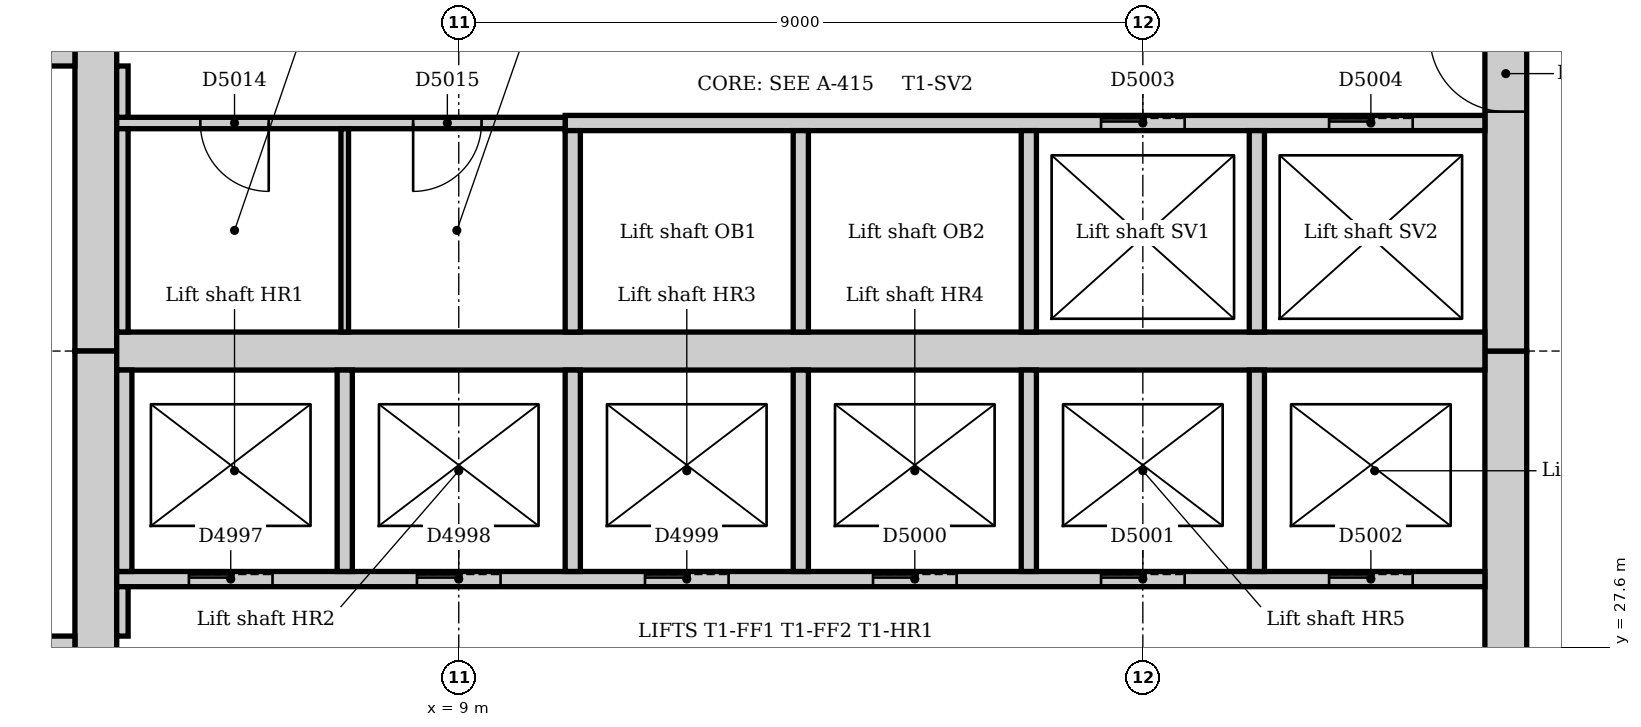
"""IFC4 building model, lengths in metres.
Left out: names, types, materials, properties, quantities, classifications, styles, units other than length and angle.
Written with IfcOpenShell. Run it as: python <this file> out.ifc"""

import sys

from ifc_helpers import new_model, si_unit, direction, frame, frame_2d, origin, place, context, subcontext, project, spatial, rectangle, extrude, element, fill, save


model = new_model("IFC4")
c1 = context("Model", 3, precision=1e-05, world=origin(), true_north=direction((0.0, 1.0)))
c2 = subcontext(c1, "Body", "Model", "MODEL_VIEW")
j1 = project(units=[si_unit("LENGTHUNIT", "METRE"), si_unit("PLANEANGLEUNIT", "RADIAN")], contexts=[c1])
p1 = place(None, origin())
s1 = spatial("IfcSite", under=j1, at=p1, CompositionType="ELEMENT")
p2 = place(p1, origin())
s2 = spatial("IfcBuilding", under=s1, at=p2, CompositionType="ELEMENT")
p3 = place(p2, frame((0.0, 0.0, 206.0)))
s3 = spatial("IfcBuildingStorey", under=s2, at=p3, CompositionType="ELEMENT", Elevation=206.0)
p4 = place(p3, frame((22.775, 21.0, 0.0), z_axis=(0.0, 0.0, 1.0), x_axis=(0.0, 1.0, 0.0)))
e1 = element("IfcWall", 1, at=p4, inside=s3, PredefinedType="SOLIDWALL", context=c2, shape_type="SweptSolid", body=[
    extrude(rectangle(XDim=10.5, YDim=0.55, at=frame_2d((5.25, 0.0))), origin(), (0.0, 0.0, 1.0), 4.0),
])
p5 = place(p4, frame((4.35, 0.0, 0.0)))
e2 = element("IfcOpeningElement", 2, at=p5, cuts=e1, PredefinedType="OPENING", context=c2, shape_type="SweptSolid", body=[
    extrude(rectangle(XDim=1.8, YDim=2.1, at=frame_2d((0.9, 1.05))), frame((0.0, 0.285, 0.0), z_axis=(0.0, -1.0, 0.0), x_axis=(1.0, 0.0, 0.0)), (0.0, 0.0, 1.0), 0.57),
])
p6 = place(p3, frame((22.775, 31.5, 0.0), z_axis=(0.0, 0.0, 1.0), x_axis=(0.0, 1.0, 0.0)))
e3 = element("IfcWall", 3, at=p6, inside=s3, PredefinedType="SOLIDWALL", context=c2, shape_type="SweptSolid", body=[
    extrude(rectangle(XDim=10.5, YDim=0.55, at=frame_2d((5.25, 0.0))), origin(), (0.0, 0.0, 1.0), 4.0),
])
p7 = place(p6, frame((3.15, 0.0, 0.0)))
e4 = element("IfcOpeningElement", 4, at=p7, cuts=e3, PredefinedType="OPENING", context=c2, shape_type="SweptSolid", body=[
    extrude(rectangle(XDim=1.0, YDim=2.1, at=frame_2d((0.5, 1.05))), frame((0.0, 0.285, 0.0), z_axis=(0.0, -1.0, 0.0), x_axis=(1.0, 0.0, 0.0)), (0.0, 0.0, 1.0), 0.57),
])
p8 = place(p6, frame((5.2, 0.0, 0.0)))
e5 = element("IfcOpeningElement", 5, at=p8, cuts=e3, PredefinedType="OPENING", context=c2, shape_type="SweptSolid", body=[
    extrude(rectangle(XDim=1.0, YDim=2.1, at=frame_2d((0.5, 1.05))), frame((0.0, 0.285, 0.0), z_axis=(0.0, -1.0, 0.0), x_axis=(1.0, 0.0, 0.0)), (0.0, 0.0, 1.0), 0.57),
])
p9 = place(p3, frame((4.225, 42.0, 0.0), z_axis=(0.0, 0.0, 1.0), x_axis=(0.0, -1.0, 0.0)))
e6 = element("IfcWall", 6, at=p9, inside=s3, PredefinedType="SOLIDWALL", context=c2, shape_type="SweptSolid", body=[
    extrude(rectangle(XDim=10.5, YDim=0.55, at=frame_2d((5.25, 0.0))), origin(), (0.0, 0.0, 1.0), 4.0),
])
p10 = place(p9, frame((5.3, 0.0, 0.0)))
e7 = element("IfcOpeningElement", 7, at=p10, cuts=e6, PredefinedType="OPENING", context=c2, shape_type="SweptSolid", body=[
    extrude(rectangle(XDim=1.0, YDim=2.1, at=frame_2d((0.5, 1.05))), frame((0.0, 0.285, 0.0), z_axis=(0.0, -1.0, 0.0), x_axis=(1.0, 0.0, 0.0)), (0.0, 0.0, 1.0), 0.57),
])
p11 = place(p3, frame((4.225, 31.5, 0.0), z_axis=(0.0, 0.0, 1.0), x_axis=(0.0, -1.0, 0.0)))
e8 = element("IfcWall", 8, at=p11, inside=s3, PredefinedType="SOLIDWALL", context=c2, shape_type="SweptSolid", body=[
    extrude(rectangle(XDim=10.5, YDim=0.55, at=frame_2d((5.25, 0.0))), origin(), (0.0, 0.0, 1.0), 4.0),
])
p12 = place(p11, frame((4.25, 0.0, 0.0)))
e9 = element("IfcOpeningElement", 9, at=p12, cuts=e8, PredefinedType="OPENING", context=c2, shape_type="SweptSolid", body=[
    extrude(rectangle(XDim=1.0, YDim=2.1, at=frame_2d((0.5, 1.05))), frame((0.0, 0.285, 0.0), z_axis=(0.0, -1.0, 0.0), x_axis=(1.0, 0.0, 0.0)), (0.0, 0.0, 1.0), 0.57),
])
p13 = place(p3, frame((4.5, 31.5, 0.0), z_axis=(0.0, 0.0, 1.0), x_axis=(1.0, 0.0, 0.0)))
e10 = element("IfcWall", 10, at=p13, inside=s3, PredefinedType="SOLIDWALL", context=c2, shape_type="SweptSolid", body=[
    extrude(rectangle(XDim=18.0, YDim=0.5, at=frame_2d((9.0, 0.0))), origin(), (0.0, 0.0, 1.0), 4.0),
])
p14 = place(p3, frame((3.95, 27.625, 0.0), z_axis=(0.0, 0.0, 1.0), x_axis=(-1.0, 0.0, 0.0)))
e11 = element("IfcWall", 11, at=p14, inside=s3, PredefinedType="SOLIDWALL", context=c2, shape_type="SweptSolid", body=[
    extrude(rectangle(XDim=3.59, YDim=0.25, at=frame_2d((1.795, 0.0))), origin(), (0.0, 0.0, 1.0), 4.0),
])
p15 = place(p14, frame((0.45, 0.0, 0.0)))
e12 = element("IfcOpeningElement", 12, at=p15, cuts=e11, PredefinedType="OPENING", context=c2, shape_type="SweptSolid", body=[
    extrude(rectangle(XDim=1.0, YDim=2.1, at=frame_2d((0.5, 1.05))), frame((0.0, 0.135, 0.0), z_axis=(0.0, -1.0, 0.0), x_axis=(1.0, 0.0, 0.0)), (0.0, 0.0, 1.0), 0.27),
])
p16 = place(p3, frame((0.36, 35.375, 0.0), z_axis=(0.0, 0.0, 1.0), x_axis=(1.0, 0.0, 0.0)))
e13 = element("IfcWall", 13, at=p16, inside=s3, PredefinedType="SOLIDWALL", context=c2, shape_type="SweptSolid", body=[
    extrude(rectangle(XDim=3.59, YDim=0.25, at=frame_2d((1.795, 0.0))), origin(), (0.0, 0.0, 1.0), 4.0),
])
p17 = place(p16, frame((2.14, 0.0, 0.0)))
e14 = element("IfcOpeningElement", 14, at=p17, cuts=e13, PredefinedType="OPENING", context=c2, shape_type="SweptSolid", body=[
    extrude(rectangle(XDim=1.0, YDim=2.1, at=frame_2d((0.5, 1.05))), frame((0.0, 0.135, 0.0), z_axis=(0.0, -1.0, 0.0), x_axis=(1.0, 0.0, 0.0)), (0.0, 0.0, 1.0), 0.27),
])
p18 = place(p3, frame((4.5, 28.5, 0.0), z_axis=(0.0, 0.0, 1.0), x_axis=(1.0, 0.0, 0.0)))
e15 = element("IfcWall", 15, at=p18, inside=s3, PredefinedType="PARTITIONING", context=c2, shape_type="SweptSolid", body=[
    extrude(rectangle(XDim=18.0, YDim=0.2, at=frame_2d((9.0, 0.0))), origin(), (0.0, 0.0, 1.0), 3.85),
])
p19 = place(p18, frame((0.95, 0.0, 0.0)))
e16 = element("IfcOpeningElement", 16, at=p19, cuts=e15, PredefinedType="OPENING", context=c2, shape_type="SweptSolid", body=[
    extrude(rectangle(XDim=1.1, YDim=2.1, at=frame_2d((0.55, 1.05))), frame((0.0, 0.11, 0.0), z_axis=(0.0, -1.0, 0.0), x_axis=(1.0, 0.0, 0.0)), (0.0, 0.0, 1.0), 0.22),
])
p20 = place(p18, frame((3.95, 0.0, 0.0)))
e17 = element("IfcOpeningElement", 17, at=p20, cuts=e15, PredefinedType="OPENING", context=c2, shape_type="SweptSolid", body=[
    extrude(rectangle(XDim=1.1, YDim=2.1, at=frame_2d((0.55, 1.05))), frame((0.0, 0.11, 0.0), z_axis=(0.0, -1.0, 0.0), x_axis=(1.0, 0.0, 0.0)), (0.0, 0.0, 1.0), 0.22),
])
p21 = place(p18, frame((6.95, 0.0, 0.0)))
e18 = element("IfcOpeningElement", 18, at=p21, cuts=e15, PredefinedType="OPENING", context=c2, shape_type="SweptSolid", body=[
    extrude(rectangle(XDim=1.1, YDim=2.1, at=frame_2d((0.55, 1.05))), frame((0.0, 0.11, 0.0), z_axis=(0.0, -1.0, 0.0), x_axis=(1.0, 0.0, 0.0)), (0.0, 0.0, 1.0), 0.22),
])
p22 = place(p18, frame((9.95, 0.0, 0.0)))
e19 = element("IfcOpeningElement", 19, at=p22, cuts=e15, PredefinedType="OPENING", context=c2, shape_type="SweptSolid", body=[
    extrude(rectangle(XDim=1.1, YDim=2.1, at=frame_2d((0.55, 1.05))), frame((0.0, 0.11, 0.0), z_axis=(0.0, -1.0, 0.0), x_axis=(1.0, 0.0, 0.0)), (0.0, 0.0, 1.0), 0.22),
])
p23 = place(p18, frame((12.95, 0.0, 0.0)))
e20 = element("IfcOpeningElement", 20, at=p23, cuts=e15, PredefinedType="OPENING", context=c2, shape_type="SweptSolid", body=[
    extrude(rectangle(XDim=1.1, YDim=2.1, at=frame_2d((0.55, 1.05))), frame((0.0, 0.11, 0.0), z_axis=(0.0, -1.0, 0.0), x_axis=(1.0, 0.0, 0.0)), (0.0, 0.0, 1.0), 0.22),
])
p24 = place(p18, frame((15.95, 0.0, 0.0)))
e21 = element("IfcOpeningElement", 21, at=p24, cuts=e15, PredefinedType="OPENING", context=c2, shape_type="SweptSolid", body=[
    extrude(rectangle(XDim=1.1, YDim=2.1, at=frame_2d((0.55, 1.05))), frame((0.0, 0.11, 0.0), z_axis=(0.0, -1.0, 0.0), x_axis=(1.0, 0.0, 0.0)), (0.0, 0.0, 1.0), 0.22),
])
p25 = place(p3, frame((10.4, 34.5, 0.0), z_axis=(0.0, 0.0, 1.0), x_axis=(1.0, 0.0, 0.0)))
e22 = element("IfcWall", 22, at=p25, inside=s3, PredefinedType="PARTITIONING", context=c2, shape_type="SweptSolid", body=[
    extrude(rectangle(XDim=12.1, YDim=0.2, at=frame_2d((6.05, 0.0))), origin(), (0.0, 0.0, 1.0), 3.85),
])
p26 = place(p25, frame((7.05, 0.0, 0.0)))
e23 = element("IfcOpeningElement", 23, at=p26, cuts=e22, PredefinedType="OPENING", context=c2, shape_type="SweptSolid", body=[
    extrude(rectangle(XDim=1.1, YDim=2.1, at=frame_2d((0.55, 1.05))), frame((0.0, 0.11, 0.0), z_axis=(0.0, -1.0, 0.0), x_axis=(1.0, 0.0, 0.0)), (0.0, 0.0, 1.0), 0.22),
])
p27 = place(p25, frame((10.05, 0.0, 0.0)))
e24 = element("IfcOpeningElement", 24, at=p27, cuts=e22, PredefinedType="OPENING", context=c2, shape_type="SweptSolid", body=[
    extrude(rectangle(XDim=1.1, YDim=2.1, at=frame_2d((0.55, 1.05))), frame((0.0, 0.11, 0.0), z_axis=(0.0, -1.0, 0.0), x_axis=(1.0, 0.0, 0.0)), (0.0, 0.0, 1.0), 0.22),
])
for number, where, z_axis, x_axis in (
    (25, (10.5, 28.6, 0.0), (0.0, 0.0, 1.0), (0.0, 1.0, 0.0)),
    (26, (10.5, 31.75, 0.0), (0.0, 0.0, 1.0), (0.0, 1.0, 0.0)),
    (27, (13.5, 28.6, 0.0), (0.0, 0.0, 1.0), (0.0, 1.0, 0.0)),
    (28, (13.5, 31.75, 0.0), (0.0, 0.0, 1.0), (0.0, 1.0, 0.0)),
    (29, (16.5, 28.6, 0.0), (0.0, 0.0, 1.0), (0.0, 1.0, 0.0)),
    (30, (16.5, 31.75, 0.0), (0.0, 0.0, 1.0), (0.0, 1.0, 0.0)),
    (31, (19.5, 28.6, 0.0), (0.0, 0.0, 1.0), (0.0, 1.0, 0.0)),
    (32, (19.5, 31.75, 0.0), (0.0, 0.0, 1.0), (0.0, 1.0, 0.0)),
    (33, (4.6, 28.6, 0.0), (0.0, 0.0, 1.0), (0.0, 1.0, 0.0)),
    (34, (7.5, 28.6, 0.0), (0.0, 0.0, 1.0), (0.0, 1.0, 0.0)),
):
    element("IfcWall", number, at=place(p3, frame(where, z_axis=z_axis, x_axis=x_axis)), inside=s3, PredefinedType="PARTITIONING", context=c2, shape_type="SweptSolid", body=[
        extrude(rectangle(XDim=2.65, YDim=0.2, at=frame_2d((1.325, 0.0))), origin(), (0.0, 0.0, 1.0), 3.85),
    ])
p28 = place(p3, frame((4.5, 34.5, 0.0), z_axis=(0.0, 0.0, 1.0), x_axis=(1.0, 0.0, 0.0)))
e35 = element("IfcWall", 35, at=p28, inside=s3, PredefinedType="PARTITIONING", context=c2, shape_type="SweptSolid", body=[
    extrude(rectangle(XDim=5.9, YDim=0.15, at=frame_2d((2.95, 0.0))), origin(), (0.0, 0.0, 1.0), 3.85),
])
p29 = place(p28, frame((1.1, 0.0, 0.0)))
e36 = element("IfcOpeningElement", 36, at=p29, cuts=e35, PredefinedType="OPENING", context=c2, shape_type="SweptSolid", body=[
    extrude(rectangle(XDim=0.9, YDim=2.1, at=frame_2d((0.45, 1.05))), frame((0.0, 0.085, 0.0), z_axis=(0.0, -1.0, 0.0), x_axis=(1.0, 0.0, 0.0)), (0.0, 0.0, 1.0), 0.17),
])
p30 = place(p28, frame((3.9, 0.0, 0.0)))
e37 = element("IfcOpeningElement", 37, at=p30, cuts=e35, PredefinedType="OPENING", context=c2, shape_type="SweptSolid", body=[
    extrude(rectangle(XDim=0.9, YDim=2.1, at=frame_2d((0.45, 1.05))), frame((0.0, 0.085, 0.0), z_axis=(0.0, -1.0, 0.0), x_axis=(1.0, 0.0, 0.0)), (0.0, 0.0, 1.0), 0.17),
])
p31 = place(p3, frame((4.575, 34.575, 0.0), z_axis=(0.0, 0.0, 1.0), x_axis=(0.0, 1.0, 0.0)))
e38 = element("IfcWall", 38, at=p31, inside=s3, PredefinedType="PARTITIONING", context=c2, shape_type="SweptSolid", body=[
    extrude(rectangle(XDim=0.675, YDim=0.15, at=frame_2d((0.338, 0.0))), origin(), (0.0, 0.0, 1.0), 3.85),
])
p32 = place(p3, frame((4.575, 31.75, 0.0), z_axis=(0.0, 0.0, 1.0), x_axis=(0.0, 1.0, 0.0)))
e39 = element("IfcWall", 39, at=p32, inside=s3, PredefinedType="PARTITIONING", context=c2, shape_type="SweptSolid", body=[
    extrude(rectangle(XDim=2.675, YDim=0.15, at=frame_2d((1.337, 0.0))), origin(), (0.0, 0.0, 1.0), 3.85),
])
p33 = place(p3, frame((4.575, 27.75, 0.0), z_axis=(0.0, 0.0, 1.0), x_axis=(0.0, 1.0, 0.0)))
e40 = element("IfcWall", 40, at=p33, inside=s3, PredefinedType="PARTITIONING", context=c2, shape_type="SweptSolid", body=[
    extrude(rectangle(XDim=0.65, YDim=0.15, at=frame_2d((0.325, 0.0))), origin(), (0.0, 0.0, 1.0), 3.85),
])
p34 = place(p3, frame((7.5, 31.75, 0.0), z_axis=(0.0, 0.0, 1.0), x_axis=(0.0, 1.0, 0.0)))
e41 = element("IfcWall", 41, at=p34, inside=s3, PredefinedType="PARTITIONING", context=c2, shape_type="SweptSolid", body=[
    extrude(rectangle(XDim=2.675, YDim=0.1, at=frame_2d((1.337, 0.0))), origin(), (0.0, 0.0, 1.0), 3.85),
])
p35 = place(p19, origin())
e42 = element("IfcDoor", 42, at=p35, inside=s3, OperationType="SLIDING_TO_LEFT", PredefinedType="DOOR", context=c2, shape_type="SweptSolid", body=[
    extrude(rectangle(XDim=1.1, YDim=2.1, at=frame_2d((0.55, 1.05))), frame((0.0, 0.025, 0.0), z_axis=(0.0, -1.0, 0.0), x_axis=(1.0, 0.0, 0.0)), (0.0, 0.0, 1.0), 0.05),
])
fill(e16, e42)
p36 = place(p20, origin())
e43 = element("IfcDoor", 43, at=p36, inside=s3, OperationType="SLIDING_TO_LEFT", PredefinedType="DOOR", context=c2, shape_type="SweptSolid", body=[
    extrude(rectangle(XDim=1.1, YDim=2.1, at=frame_2d((0.55, 1.05))), frame((0.0, 0.025, 0.0), z_axis=(0.0, -1.0, 0.0), x_axis=(1.0, 0.0, 0.0)), (0.0, 0.0, 1.0), 0.05),
])
fill(e17, e43)
p37 = place(p21, origin())
e44 = element("IfcDoor", 44, at=p37, inside=s3, OperationType="SLIDING_TO_LEFT", PredefinedType="DOOR", context=c2, shape_type="SweptSolid", body=[
    extrude(rectangle(XDim=1.1, YDim=2.1, at=frame_2d((0.55, 1.05))), frame((0.0, 0.025, 0.0), z_axis=(0.0, -1.0, 0.0), x_axis=(1.0, 0.0, 0.0)), (0.0, 0.0, 1.0), 0.05),
])
fill(e18, e44)
p38 = place(p22, origin())
e45 = element("IfcDoor", 45, at=p38, inside=s3, OperationType="SLIDING_TO_LEFT", PredefinedType="DOOR", context=c2, shape_type="SweptSolid", body=[
    extrude(rectangle(XDim=1.1, YDim=2.1, at=frame_2d((0.55, 1.05))), frame((0.0, 0.025, 0.0), z_axis=(0.0, -1.0, 0.0), x_axis=(1.0, 0.0, 0.0)), (0.0, 0.0, 1.0), 0.05),
])
fill(e19, e45)
p39 = place(p23, origin())
e46 = element("IfcDoor", 46, at=p39, inside=s3, OperationType="SLIDING_TO_LEFT", PredefinedType="DOOR", context=c2, shape_type="SweptSolid", body=[
    extrude(rectangle(XDim=1.1, YDim=2.1, at=frame_2d((0.55, 1.05))), frame((0.0, 0.025, 0.0), z_axis=(0.0, -1.0, 0.0), x_axis=(1.0, 0.0, 0.0)), (0.0, 0.0, 1.0), 0.05),
])
fill(e20, e46)
p40 = place(p24, origin())
e47 = element("IfcDoor", 47, at=p40, inside=s3, OperationType="SLIDING_TO_LEFT", PredefinedType="DOOR", context=c2, shape_type="SweptSolid", body=[
    extrude(rectangle(XDim=1.1, YDim=2.1, at=frame_2d((0.55, 1.05))), frame((0.0, 0.025, 0.0), z_axis=(0.0, -1.0, 0.0), x_axis=(1.0, 0.0, 0.0)), (0.0, 0.0, 1.0), 0.05),
])
fill(e21, e47)
p41 = place(p26, origin())
e48 = element("IfcDoor", 48, at=p41, inside=s3, OperationType="SLIDING_TO_LEFT", PredefinedType="DOOR", context=c2, shape_type="SweptSolid", body=[
    extrude(rectangle(XDim=1.1, YDim=2.1, at=frame_2d((0.55, 1.05))), frame((0.0, 0.025, 0.0), z_axis=(0.0, -1.0, 0.0), x_axis=(1.0, 0.0, 0.0)), (0.0, 0.0, 1.0), 0.05),
])
fill(e23, e48)
p42 = place(p27, origin())
e49 = element("IfcDoor", 49, at=p42, inside=s3, OperationType="SLIDING_TO_LEFT", PredefinedType="DOOR", context=c2, shape_type="SweptSolid", body=[
    extrude(rectangle(XDim=1.1, YDim=2.1, at=frame_2d((0.55, 1.05))), frame((0.0, 0.025, 0.0), z_axis=(0.0, -1.0, 0.0), x_axis=(1.0, 0.0, 0.0)), (0.0, 0.0, 1.0), 0.05),
])
fill(e24, e49)
p43 = place(p7, origin())
e50 = element("IfcDoor", 50, at=p43, inside=s3, OperationType="SINGLE_SWING_RIGHT", PredefinedType="DOOR", context=c2, shape_type="SweptSolid", body=[
    extrude(rectangle(XDim=1.0, YDim=2.1, at=frame_2d((0.5, 1.05))), frame((0.0, 0.025, 0.0), z_axis=(0.0, -1.0, 0.0), x_axis=(1.0, 0.0, 0.0)), (0.0, 0.0, 1.0), 0.05),
])
fill(e4, e50)
p44 = place(p29, frame((0.9, 0.0, 0.0), z_axis=(0.0, 0.0, 1.0), x_axis=(-1.0, 0.0, 0.0)))
e51 = element("IfcDoor", 51, at=p44, inside=s3, OperationType="SINGLE_SWING_LEFT", PredefinedType="DOOR", context=c2, shape_type="SweptSolid", body=[
    extrude(rectangle(XDim=0.9, YDim=2.1, at=frame_2d((0.45, 1.05))), frame((0.0, 0.025, 0.0), z_axis=(0.0, -1.0, 0.0), x_axis=(1.0, 0.0, 0.0)), (0.0, 0.0, 1.0), 0.05),
])
fill(e36, e51)
p45 = place(p30, frame((0.9, 0.0, 0.0), z_axis=(0.0, 0.0, 1.0), x_axis=(-1.0, 0.0, 0.0)))
e52 = element("IfcDoor", 52, at=p45, inside=s3, OperationType="SINGLE_SWING_RIGHT", PredefinedType="DOOR", context=c2, shape_type="SweptSolid", body=[
    extrude(rectangle(XDim=0.9, YDim=2.1, at=frame_2d((0.45, 1.05))), frame((0.0, 0.025, 0.0), z_axis=(0.0, -1.0, 0.0), x_axis=(1.0, 0.0, 0.0)), (0.0, 0.0, 1.0), 0.05),
])
fill(e37, e52)
save(model, sys.argv[1])
